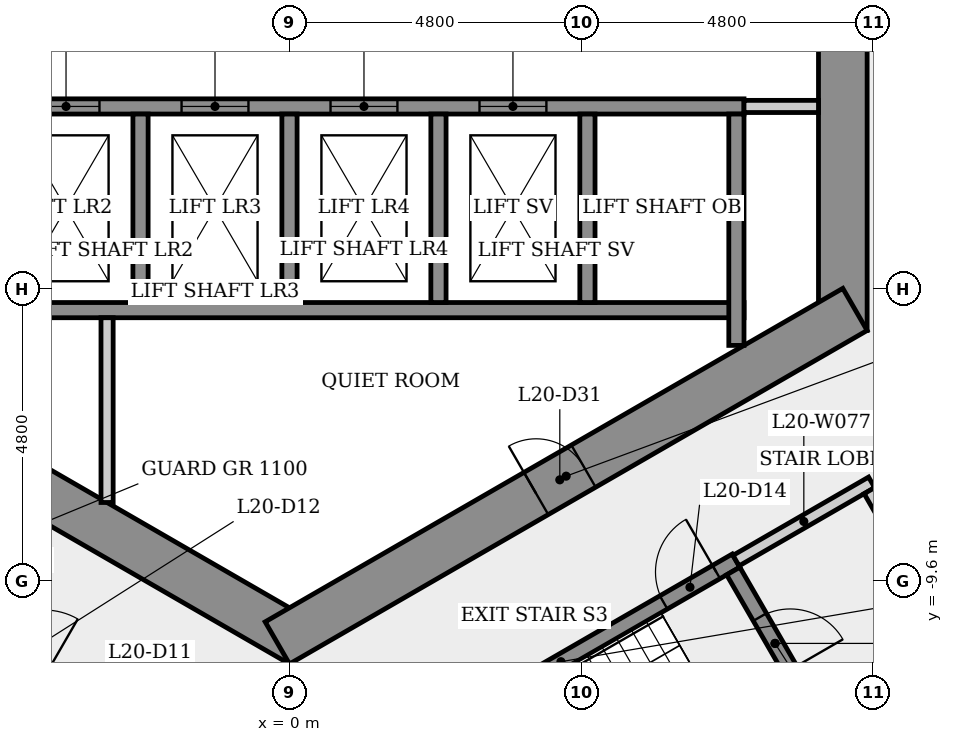
"""IFC4 building model, lengths in metres.
Left out: names, types, materials, properties, quantities, classifications, styles, units other than length and angle.
Written with IfcOpenShell. Run it as: python <this file> out.ifc"""

import sys

from ifc_helpers import new_model, si_unit, direction, frame, frame_2d, origin, place, context, subcontext, project, spatial, rectangle, extrude, element, fill, save


model = new_model("IFC4")
c1 = context("Model", 3, precision=1e-05, world=origin(), true_north=direction((0.0, 1.0)))
c2 = subcontext(c1, "Body", "Model", "MODEL_VIEW")
j1 = project(units=[si_unit("LENGTHUNIT", "METRE"), si_unit("PLANEANGLEUNIT", "RADIAN")], contexts=[c1])
p1 = place(None, origin())
s1 = spatial("IfcSite", under=j1, at=p1, CompositionType="ELEMENT")
p2 = place(p1, origin())
s2 = spatial("IfcBuilding", under=s1, at=p2, CompositionType="ELEMENT")
p3 = place(p2, frame((0.0, 0.0, 78.3)))
s3 = spatial("IfcBuildingStorey", under=s2, at=p3, CompositionType="ELEMENT", Elevation=78.3)
p4 = place(p3, frame((9.1, -5.485, 0.0), z_axis=(0.0, 0.0, 1.0), x_axis=(0.0, 1.0, 0.0)))
e1 = element("IfcWall", 1, at=p4, inside=s3, PredefinedType="SHEAR", context=c2, shape_type="SweptSolid", body=[
    extrude(rectangle(XDim=10.97, YDim=0.8, at=frame_2d((5.485, 0.0))), origin(), (0.0, 0.0, 1.0), 4.8),
])
p5 = place(p4, frame((4.685, 0.0, 0.0)))
e2 = element("IfcOpeningElement", 2, at=p5, cuts=e1, PredefinedType="OPENING", context=c2, shape_type="SweptSolid", body=[
    extrude(rectangle(XDim=1.6, YDim=2.1, at=frame_2d((0.8, 1.05))), frame((0.0, 0.41, 0.0), z_axis=(0.0, -1.0, 0.0), x_axis=(1.0, 0.0, 0.0)), (0.0, 0.0, 1.0), 0.82),
])
p6 = place(p3, frame((-9.3, -5.138, 0.0), z_axis=(0.0, 0.0, 1.0), x_axis=(0.866023993627, -0.500002442456, 0.0)))
e3 = element("IfcWall", 3, at=p6, inside=s3, PredefinedType="SHEAR", context=c2, shape_type="SweptSolid", body=[
    extrude(rectangle(XDim=10.97, YDim=0.8, at=frame_2d((5.485, 0.0))), origin(), (0.0, 0.0, 1.0), 4.8),
])
p7 = place(p6, frame((2.091, 0.0, 0.0)))
e4 = element("IfcOpeningElement", 4, at=p7, cuts=e3, PredefinedType="OPENING", context=c2, shape_type="SweptSolid", body=[
    extrude(rectangle(XDim=0.9, YDim=2.1, at=frame_2d((0.45, 1.05))), frame((0.0, 0.41, 0.0), z_axis=(0.0, -1.0, 0.0), x_axis=(1.0, 0.0, 0.0)), (0.0, 0.0, 1.0), 0.82),
])
p8 = place(p3, frame((-0.2, -10.623, 0.0), z_axis=(0.0, 0.0, 1.0), x_axis=(0.866023993627, 0.500002442456, 0.0)))
e5 = element("IfcWall", 5, at=p8, inside=s3, PredefinedType="SHEAR", context=c2, shape_type="SweptSolid", body=[
    extrude(rectangle(XDim=10.97, YDim=0.8, at=frame_2d((5.485, 0.0))), origin(), (0.0, 0.0, 1.0), 4.8),
])
p9 = place(p8, frame((4.914, 0.0, 0.0)))
e6 = element("IfcOpeningElement", 6, at=p9, cuts=e5, PredefinedType="OPENING", context=c2, shape_type="SweptSolid", body=[
    extrude(rectangle(XDim=0.9, YDim=2.1, at=frame_2d((0.45, 1.05))), frame((0.0, 0.41, 0.0), z_axis=(0.0, -1.0, 0.0), x_axis=(1.0, 0.0, 0.0)), (0.0, 0.0, 1.0), 0.82),
])
p10 = place(p3, frame((-6.435, -9.795, 0.0), z_axis=(0.0, 0.0, 1.0), x_axis=(0.866012907634, -0.500021643343, 0.0)))
e7 = element("IfcWall", 7, at=p10, inside=s3, PredefinedType="PARTITIONING", context=c2, shape_type="SweptSolid", body=[
    extrude(rectangle(XDim=4.45, YDim=0.2, at=frame_2d((2.225, 0.0))), origin(), (0.0, 0.0, 1.0), 4.45),
])
p11 = place(p10, frame((1.675, 0.0, 0.0)))
e8 = element("IfcOpeningElement", 8, at=p11, cuts=e7, PredefinedType="OPENING", context=c2, shape_type="SweptSolid", body=[
    extrude(rectangle(XDim=1.1, YDim=2.1, at=frame_2d((0.55, 1.05))), frame((0.0, 0.11, 0.0), z_axis=(0.0, -1.0, 0.0), x_axis=(1.0, 0.0, 0.0)), (0.0, 0.0, 1.0), 0.22),
])
p12 = place(p3, frame((-7.225, -5.15, 0.0), z_axis=(0.0, 0.0, 1.0), x_axis=(1.0, 0.0, 0.0)))
e9 = element("IfcWall", 9, at=p12, inside=s3, PredefinedType="SHEAR", context=c2, shape_type="SweptSolid", body=[
    extrude(rectangle(XDim=14.7, YDim=0.25, at=frame_2d((7.35, 0.0))), origin(), (0.0, 0.0, 1.0), 4.45),
])
p13 = place(p3, frame((-7.225, -1.8, 0.0), z_axis=(0.0, 0.0, 1.0), x_axis=(1.0, 0.0, 0.0)))
e10 = element("IfcWall", 10, at=p13, inside=s3, PredefinedType="SHEAR", context=c2, shape_type="SweptSolid", body=[
    extrude(rectangle(XDim=14.7, YDim=0.25, at=frame_2d((7.35, 0.0))), origin(), (0.0, 0.0, 1.0), 4.45),
])
p14 = place(p13, frame((0.597, 0.0, 0.0)))
e11 = element("IfcOpeningElement", 11, at=p14, cuts=e10, PredefinedType="OPENING", context=c2, shape_type="SweptSolid", body=[
    extrude(rectangle(XDim=1.1, YDim=2.1, at=frame_2d((0.55, 1.05))), frame((0.0, 0.135, 0.0), z_axis=(0.0, -1.0, 0.0), x_axis=(1.0, 0.0, 0.0)), (0.0, 0.0, 1.0), 0.27),
])
p15 = place(p13, frame((3.0, 0.0, 0.0)))
e12 = element("IfcOpeningElement", 12, at=p15, cuts=e10, PredefinedType="OPENING", context=c2, shape_type="SweptSolid", body=[
    extrude(rectangle(XDim=1.1, YDim=2.1, at=frame_2d((0.55, 1.05))), frame((0.0, 0.135, 0.0), z_axis=(0.0, -1.0, 0.0), x_axis=(1.0, 0.0, 0.0)), (0.0, 0.0, 1.0), 0.27),
])
p16 = place(p13, frame((5.45, 0.0, 0.0)))
e13 = element("IfcOpeningElement", 13, at=p16, cuts=e10, PredefinedType="OPENING", context=c2, shape_type="SweptSolid", body=[
    extrude(rectangle(XDim=1.1, YDim=2.1, at=frame_2d((0.55, 1.05))), frame((0.0, 0.135, 0.0), z_axis=(0.0, -1.0, 0.0), x_axis=(1.0, 0.0, 0.0)), (0.0, 0.0, 1.0), 0.27),
])
p17 = place(p13, frame((7.9, 0.0, 0.0)))
e14 = element("IfcOpeningElement", 14, at=p17, cuts=e10, PredefinedType="OPENING", context=c2, shape_type="SweptSolid", body=[
    extrude(rectangle(XDim=1.1, YDim=2.1, at=frame_2d((0.55, 1.05))), frame((0.0, 0.135, 0.0), z_axis=(0.0, -1.0, 0.0), x_axis=(1.0, 0.0, 0.0)), (0.0, 0.0, 1.0), 0.27),
])
p18 = place(p13, frame((10.35, 0.0, 0.0)))
e15 = element("IfcOpeningElement", 15, at=p18, cuts=e10, PredefinedType="OPENING", context=c2, shape_type="SweptSolid", body=[
    extrude(rectangle(XDim=1.1, YDim=2.1, at=frame_2d((0.55, 1.05))), frame((0.0, 0.135, 0.0), z_axis=(0.0, -1.0, 0.0), x_axis=(1.0, 0.0, 0.0)), (0.0, 0.0, 1.0), 0.27),
])
p19 = place(p3, frame((-3.0, -5.275, 0.0), z_axis=(0.0, 0.0, 1.0), x_axis=(0.0, -1.0, 0.0)))
e16 = element("IfcWall", 16, at=p19, inside=s3, PredefinedType="PARTITIONING", context=c2, shape_type="SweptSolid", body=[
    extrude(rectangle(XDim=3.039, YDim=0.2, at=frame_2d((1.52, 0.0))), origin(), (0.0, 0.0, 1.0), 4.45),
])
for number, where, z_axis, x_axis in (
    (17, (-2.45, -1.925, 0.0), (0.0, 0.0, 1.0), (0.0, -1.0, 0.0)),
    (18, (0.0, -1.925, 0.0), (0.0, 0.0, 1.0), (0.0, -1.0, 0.0)),
):
    element("IfcWall", number, at=place(p3, frame(where, z_axis=z_axis, x_axis=x_axis)), inside=s3, PredefinedType="SHEAR", context=c2, shape_type="SweptSolid", body=[
        extrude(rectangle(XDim=3.1, YDim=0.25, at=frame_2d((1.55, 0.0))), origin(), (0.0, 0.0, 1.0), 4.8),
    ])
p20 = place(p3, frame((1.585, -12.595, 0.0), z_axis=(0.0, 0.0, 1.0), x_axis=(0.866036417653, 0.499980922934, 0.0)))
e19 = element("IfcWall", 19, at=p20, inside=s3, PredefinedType="SHEAR", context=c2, shape_type="SweptSolid", body=[
    extrude(rectangle(XDim=6.65, YDim=0.25, at=frame_2d((3.325, 0.0))), origin(), (0.0, 0.0, 1.0), 4.45),
])
p21 = place(p20, frame((5.275, 0.0, 0.0)))
e20 = element("IfcOpeningElement", 20, at=p21, cuts=e19, PredefinedType="OPENING", context=c2, shape_type="SweptSolid", body=[
    extrude(rectangle(XDim=1.0, YDim=2.1, at=frame_2d((0.5, 1.05))), frame((0.0, 0.135, 0.0), z_axis=(0.0, -1.0, 0.0), x_axis=(1.0, 0.0, 0.0)), (0.0, 0.0, 1.0), 0.27),
])
for number, where, z_axis, x_axis in (
    (21, (2.45, -1.925, 0.0), (0.0, 0.0, 1.0), (0.0, -1.0, 0.0)),
    (22, (4.9, -1.925, 0.0), (0.0, 0.0, 1.0), (0.0, -1.0, 0.0)),
):
    element("IfcWall", number, at=place(p3, frame(where, z_axis=z_axis, x_axis=x_axis)), inside=s3, PredefinedType="SHEAR", context=c2, shape_type="SweptSolid", body=[
        extrude(rectangle(XDim=3.1, YDim=0.25, at=frame_2d((1.55, 0.0))), origin(), (0.0, 0.0, 1.0), 4.8),
    ])
p22 = place(p3, frame((7.298, -9.441, 0.0), z_axis=(0.0, 0.0, 1.0), x_axis=(0.500034990121, -0.866005201286, 0.0)))
e23 = element("IfcWall", 23, at=p22, inside=s3, PredefinedType="SHEAR", context=c2, shape_type="SweptSolid", body=[
    extrude(rectangle(XDim=2.75, YDim=0.25, at=frame_2d((1.375, 0.0))), origin(), (0.0, 0.0, 1.0), 4.45),
])
p23 = place(p22, frame((0.875, 0.0, 0.0)))
e24 = element("IfcOpeningElement", 24, at=p23, cuts=e23, PredefinedType="OPENING", context=c2, shape_type="SweptSolid", body=[
    extrude(rectangle(XDim=1.0, YDim=2.1, at=frame_2d((0.5, 1.05))), frame((0.0, 0.135, 0.0), z_axis=(0.0, -1.0, 0.0), x_axis=(1.0, 0.0, 0.0)), (0.0, 0.0, 1.0), 0.27),
])
p24 = place(p3, frame((7.344, -9.27, 0.0), z_axis=(0.0, 0.0, 1.0), x_axis=(0.866005588531, 0.500034319456, 0.0)))
e25 = element("IfcWall", 25, at=p24, inside=s3, PredefinedType="PARTITIONING", context=c2, shape_type="SweptSolid", body=[
    extrude(rectangle(XDim=2.575, YDim=0.2, at=frame_2d((1.288, 0.0))), origin(), (0.0, 0.0, 1.0), 4.45),
])
p25 = place(p3, frame((7.35, -1.925, 0.0), z_axis=(0.0, 0.0, 1.0), x_axis=(0.0, -1.0, 0.0)))
e26 = element("IfcWall", 26, at=p25, inside=s3, PredefinedType="SHEAR", context=c2, shape_type="SweptSolid", body=[
    extrude(rectangle(XDim=3.805, YDim=0.25, at=frame_2d((1.903, 0.0))), origin(), (0.0, 0.0, 1.0), 4.45),
])
p26 = place(p3, frame((8.7, -1.8, 0.0), z_axis=(0.0, 0.0, 1.0), x_axis=(-1.0, 0.0, 0.0)))
e27 = element("IfcWall", 27, at=p26, inside=s3, PredefinedType="PARTITIONING", context=c2, shape_type="SweptSolid", body=[
    extrude(rectangle(XDim=1.225, YDim=0.2, at=frame_2d((0.613, 0.0))), origin(), (0.0, 0.0, 1.0), 4.45),
])
p27 = place(p3, frame((9.537, -8.119, 0.0), z_axis=(0.0, 0.0, 1.0), x_axis=(0.499990139034, -0.866031096941, 0.0)))
e28 = element("IfcWall", 28, at=p27, inside=s3, PredefinedType="PARTITIONING", context=c2, shape_type="SweptSolid", body=[
    extrude(rectangle(XDim=3.0, YDim=0.2, at=frame_2d((1.5, 0.0))), origin(), (0.0, 0.0, 1.0), 4.45),
])
p28 = place(p27, frame((0.935, 0.0, 0.0)))
e29 = element("IfcOpeningElement", 29, at=p28, cuts=e28, PredefinedType="OPENING", context=c2, shape_type="SweptSolid", body=[
    extrude(rectangle(XDim=1.0, YDim=2.1, at=frame_2d((0.5, 1.05))), frame((0.0, 0.11, 0.0), z_axis=(0.0, -1.0, 0.0), x_axis=(1.0, 0.0, 0.0)), (0.0, 0.0, 1.0), 0.22),
])
p29 = place(p3, frame((10.901, -10.681, 0.0), z_axis=(0.0, 0.0, 1.0), x_axis=(-0.866007538022, -0.500030943131, 0.0)))
e30 = element("IfcWall", 30, at=p29, inside=s3, PredefinedType="PLUMBINGWALL", context=c2, shape_type="SweptSolid", body=[
    extrude(rectangle(XDim=2.375, YDim=0.2, at=frame_2d((1.188, 0.0))), origin(), (0.0, 0.0, 1.0), 4.45),
])
p30 = place(p15, origin())
e31 = element("IfcDoor", 31, at=p30, inside=s3, OperationType="SLIDING_TO_LEFT", PredefinedType="DOOR", context=c2, shape_type="SweptSolid", body=[
    extrude(rectangle(XDim=1.1, YDim=2.1, at=frame_2d((0.55, 1.05))), frame((0.0, 0.025, 0.0), z_axis=(0.0, -1.0, 0.0), x_axis=(1.0, 0.0, 0.0)), (0.0, 0.0, 1.0), 0.05),
])
fill(e12, e31)
p31 = place(p16, origin())
e32 = element("IfcDoor", 32, at=p31, inside=s3, OperationType="SLIDING_TO_LEFT", PredefinedType="DOOR", context=c2, shape_type="SweptSolid", body=[
    extrude(rectangle(XDim=1.1, YDim=2.1, at=frame_2d((0.55, 1.05))), frame((0.0, 0.025, 0.0), z_axis=(0.0, -1.0, 0.0), x_axis=(1.0, 0.0, 0.0)), (0.0, 0.0, 1.0), 0.05),
])
fill(e13, e32)
p32 = place(p17, origin())
e33 = element("IfcDoor", 33, at=p32, inside=s3, OperationType="SLIDING_TO_LEFT", PredefinedType="DOOR", context=c2, shape_type="SweptSolid", body=[
    extrude(rectangle(XDim=1.1, YDim=2.1, at=frame_2d((0.55, 1.05))), frame((0.0, 0.025, 0.0), z_axis=(0.0, -1.0, 0.0), x_axis=(1.0, 0.0, 0.0)), (0.0, 0.0, 1.0), 0.05),
])
fill(e14, e33)
p33 = place(p18, origin())
e34 = element("IfcDoor", 34, at=p33, inside=s3, OperationType="SLIDING_TO_LEFT", PredefinedType="DOOR", context=c2, shape_type="SweptSolid", body=[
    extrude(rectangle(XDim=1.1, YDim=2.1, at=frame_2d((0.55, 1.05))), frame((0.0, 0.025, 0.0), z_axis=(0.0, -1.0, 0.0), x_axis=(1.0, 0.0, 0.0)), (0.0, 0.0, 1.0), 0.05),
])
fill(e15, e34)
p34 = place(p21, origin())
e35 = element("IfcDoor", 35, at=p34, inside=s3, OperationType="SINGLE_SWING_RIGHT", PredefinedType="DOOR", context=c2, shape_type="SweptSolid", body=[
    extrude(rectangle(XDim=1.0, YDim=2.1, at=frame_2d((0.5, 1.05))), frame((0.0, 0.025, 0.0), z_axis=(0.0, -1.0, 0.0), x_axis=(1.0, 0.0, 0.0)), (0.0, 0.0, 1.0), 0.05),
])
fill(e20, e35)
p35 = place(p23, origin())
e36 = element("IfcDoor", 36, at=p35, inside=s3, OperationType="SINGLE_SWING_RIGHT", PredefinedType="DOOR", context=c2, shape_type="SweptSolid", body=[
    extrude(rectangle(XDim=1.0, YDim=2.1, at=frame_2d((0.5, 1.05))), frame((0.0, 0.025, 0.0), z_axis=(0.0, -1.0, 0.0), x_axis=(1.0, 0.0, 0.0)), (0.0, 0.0, 1.0), 0.05),
])
fill(e24, e36)
p36 = place(p9, origin())
e37 = element("IfcDoor", 37, at=p36, inside=s3, OperationType="SINGLE_SWING_LEFT", PredefinedType="DOOR", context=c2, shape_type="SweptSolid", body=[
    extrude(rectangle(XDim=0.9, YDim=2.1, at=frame_2d((0.45, 1.05))), frame((0.0, 0.025, 0.0), z_axis=(0.0, -1.0, 0.0), x_axis=(1.0, 0.0, 0.0)), (0.0, 0.0, 1.0), 0.05),
])
fill(e6, e37)
save(model, sys.argv[1])
